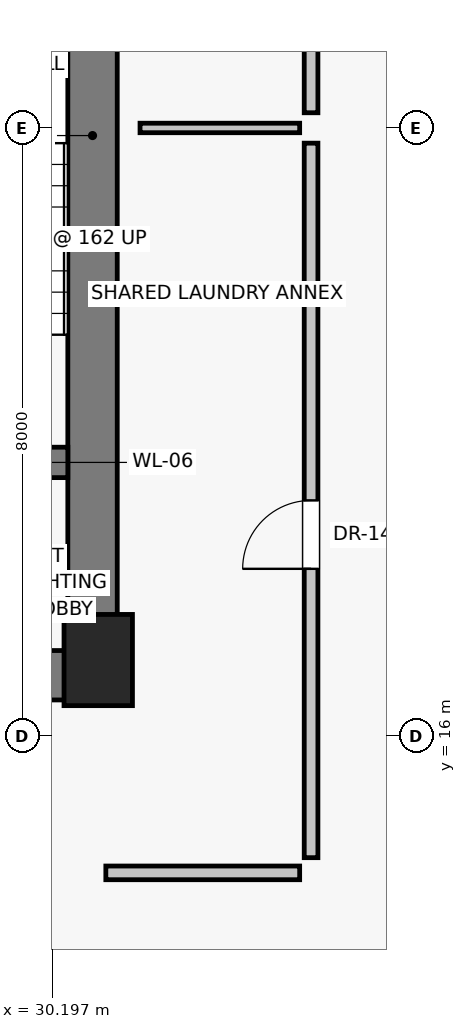
"""IFC4 building model, lengths in metres.
Left out: names, types, materials, properties, quantities, classifications, styles, units other than length and angle.
Written with IfcOpenShell. Run it as: python <this file> out.ifc"""

import sys

from ifc_helpers import new_model, si_unit, direction, frame, frame_2d, origin, origin_2d, place, context, subcontext, project, spatial, rectangle, extrude, source, transform, mapped, element, fill, save


model = new_model("IFC4")
c1 = context("Model", 3, precision=1e-05, world=origin(), true_north=direction((0.0, 1.0)))
c2 = subcontext(c1, "Body", "Model", "MODEL_VIEW")
j1 = project(units=[si_unit("LENGTHUNIT", "METRE"), si_unit("PLANEANGLEUNIT", "RADIAN")], contexts=[c1])
p1 = place(None, origin())
s1 = spatial("IfcSite", under=j1, at=p1, CompositionType="ELEMENT")
p2 = place(p1, origin())
s2 = spatial("IfcBuilding", under=s1, at=p2, CompositionType="ELEMENT")
p3 = place(p2, frame((0.0, 0.0, 123.0)))
s3 = spatial("IfcBuildingStorey", under=s2, at=p3, CompositionType="ELEMENT", Elevation=123.0)
p4 = place(p3, frame((30.8, 17.0, 0.0), z_axis=(0.0, 0.0, 1.0), x_axis=(1.0, 0.0, 0.0)))
e1 = element("IfcColumn", 1, at=p4, inside=s3, PredefinedType="PILASTER", context=c2, shape_type="SweptSolid", body=[
    extrude(rectangle(XDim=0.9, YDim=1.2, at=origin_2d()), origin(), (0.0, 0.0, 1.0), 3.25),
])
p5 = place(p3, frame((30.725, 16.8, 0.0), z_axis=(0.0, 0.0, 1.0), x_axis=(0.0, 1.0, 0.0)))
e2 = element("IfcWall", 2, at=p5, inside=s3, PredefinedType="SHEAR", context=c2, shape_type="SweptSolid", body=[
    extrude(rectangle(XDim=14.2, YDim=0.65, at=frame_2d((7.1, 0.0))), origin(), (0.0, 0.0, 1.0), 3.0),
])
p6 = place(p3, frame((24.95, 16.8, 0.0), z_axis=(0.0, 0.0, 1.0), x_axis=(1.0, 0.0, 0.0)))
e3 = element("IfcWall", 3, at=p6, inside=s3, PredefinedType="SHEAR", context=c2, shape_type="SweptSolid", body=[
    extrude(rectangle(XDim=5.85, YDim=0.65, at=frame_2d((2.925, 0.0))), origin(), (0.0, 0.0, 1.0), 3.0),
])
p7 = place(p6, frame((2.15, 0.0, 0.0)))
e4 = element("IfcOpeningElement", 4, at=p7, cuts=e3, PredefinedType="OPENING", context=c2, shape_type="SweptSolid", body=[
    extrude(rectangle(XDim=1.2, YDim=2.03, at=frame_2d((0.6, 1.015))), frame((0.0, 0.335, 0.0), z_axis=(0.0, -1.0, 0.0), x_axis=(1.0, 0.0, 0.0)), (0.0, 0.0, 1.0), 0.67),
])
p8 = place(p3, frame((27.0, 19.6, 0.0), z_axis=(0.0, 0.0, 1.0), x_axis=(1.0, 0.0, 0.0)))
e5 = element("IfcWall", 5, at=p8, inside=s3, PredefinedType="SHEAR", context=c2, shape_type="SweptSolid", body=[
    extrude(rectangle(XDim=3.4, YDim=0.4, at=frame_2d((1.7, 0.0))), origin(), (0.0, 0.0, 1.0), 3.0),
])
p9 = place(p8, frame((1.05, 0.0, 0.0)))
e6 = element("IfcOpeningElement", 6, at=p9, cuts=e5, PredefinedType="OPENING", context=c2, shape_type="SweptSolid", body=[
    extrude(rectangle(XDim=1.1, YDim=2.03, at=frame_2d((0.55, 1.015))), frame((0.0, 0.21, 0.0), z_axis=(0.0, -1.0, 0.0), x_axis=(1.0, 0.0, 0.0)), (0.0, 0.0, 1.0), 0.42),
])
p10 = place(p3, frame((33.6, 14.4, 0.0), z_axis=(0.0, 0.0, 1.0), x_axis=(0.0, 1.0, 0.0)))
e7 = element("IfcWall", 7, at=p10, inside=s3, PredefinedType="PARTITIONING", context=c2, shape_type="SweptSolid", body=[
    extrude(rectangle(XDim=9.4, YDim=0.18, at=frame_2d((4.7, 0.0))), origin(), (0.0, 0.0, 1.0), 3.0),
])
p11 = place(p10, frame((3.8, 0.0, 0.0)))
e8 = element("IfcOpeningElement", 8, at=p11, cuts=e7, PredefinedType="OPENING", context=c2, shape_type="SweptSolid", body=[
    extrude(rectangle(XDim=0.9, YDim=2.01, at=frame_2d((0.45, 1.005))), frame((0.0, 0.1, 0.0), z_axis=(0.0, -1.0, 0.0), x_axis=(1.0, 0.0, 0.0)), (0.0, 0.0, 1.0), 0.2),
])
p12 = place(p3, frame((33.6, 24.2, 0.0), z_axis=(0.0, 0.0, 1.0), x_axis=(0.0, 1.0, 0.0)))
e9 = element("IfcWall", 9, at=p12, inside=s3, PredefinedType="PARTITIONING", context=c2, shape_type="SweptSolid", body=[
    extrude(rectangle(XDim=9.2, YDim=0.18, at=frame_2d((4.6, 0.0))), origin(), (0.0, 0.0, 1.0), 3.0),
])
p13 = place(p12, frame((3.8, 0.0, 0.0)))
e10 = element("IfcOpeningElement", 10, at=p13, cuts=e9, PredefinedType="OPENING", context=c2, shape_type="SweptSolid", body=[
    extrude(rectangle(XDim=0.9, YDim=2.01, at=frame_2d((0.45, 1.005))), frame((0.0, 0.1, 0.0), z_axis=(0.0, -1.0, 0.0), x_axis=(1.0, 0.0, 0.0)), (0.0, 0.0, 1.0), 0.2),
])
p14 = place(p3, frame((31.35, 24.0, 0.0), z_axis=(0.0, 0.0, 1.0), x_axis=(1.0, 0.0, 0.0)))
e11 = element("IfcWall", 11, at=p14, inside=s3, PredefinedType="PARTITIONING", context=c2, shape_type="SweptSolid", body=[
    extrude(rectangle(XDim=2.1, YDim=0.125, at=frame_2d((1.05, 0.0))), origin(), (0.0, 0.0, 1.0), 3.0),
])
p15 = place(p3, frame((30.9, 14.2, 0.0), z_axis=(0.0, 0.0, 1.0), x_axis=(1.0, 0.0, 0.0)))
e12 = element("IfcWall", 12, at=p15, inside=s3, PredefinedType="PARTITIONING", context=c2, shape_type="SweptSolid", body=[
    extrude(rectangle(XDim=2.55, YDim=0.18, at=frame_2d((1.275, 0.0))), origin(), (0.0, 0.0, 1.0), 3.0),
])
m1 = source(origin(), c2, "Body", "SweptSolid", [
    extrude(rectangle(XDim=0.9, YDim=2.01, at=frame_2d((0.45, 1.005))), frame((0.0, 0.025, 0.0), z_axis=(0.0, -1.0, 0.0), x_axis=(1.0, 0.0, 0.0)), (0.0, 0.0, 1.0), 0.05),
])
p16 = place(p11, origin())
e13 = element("IfcDoor", 13, at=p16, inside=s3, OperationType="SINGLE_SWING_LEFT", PredefinedType="DOOR", context=c2, shape_type="MappedRepresentation", body=[
    mapped(m1, transform((0.0, 0.0, 0.0), scale=1.0)),
])
fill(e8, e13)
save(model, sys.argv[1])
